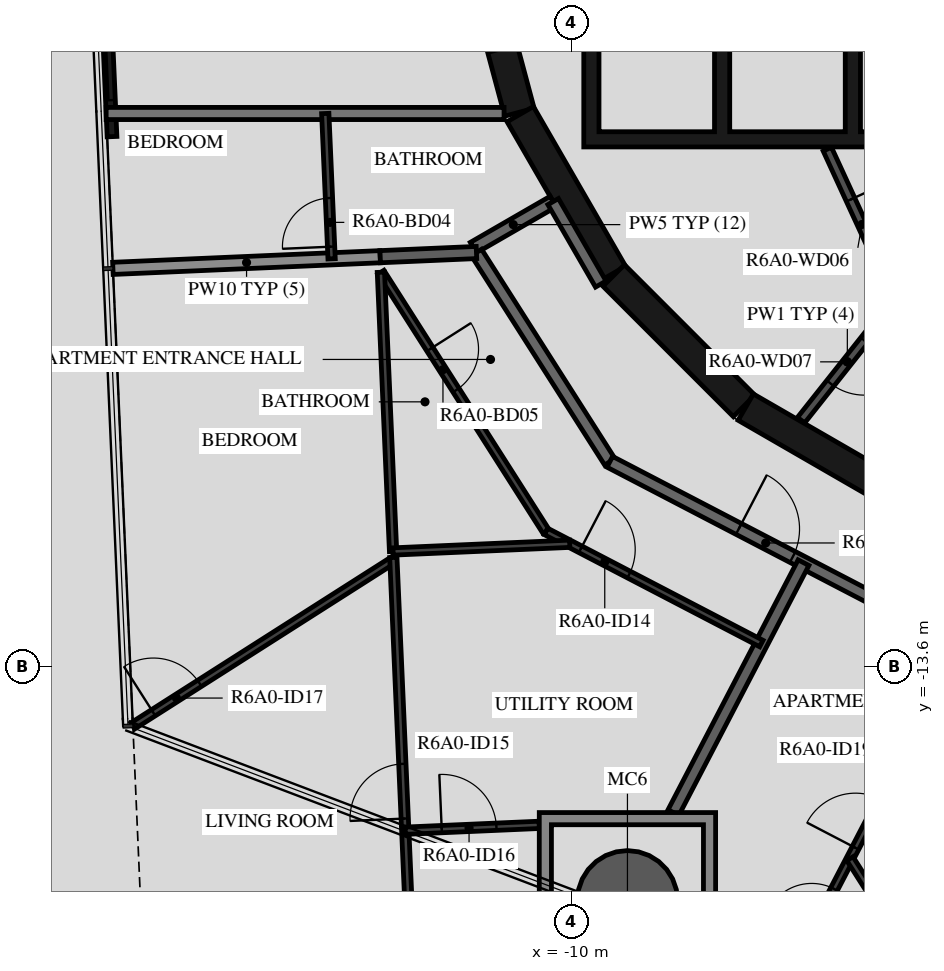
"""IFC4 building model, lengths in metres.
Left out: names, types, materials, properties, quantities, classifications, styles, units other than length and angle.
Written with IfcOpenShell. Run it as: python <this file> out.ifc"""

import sys

from ifc_helpers import new_model, si_unit, direction, frame, frame_2d, origin, origin_2d, place, context, subcontext, project, spatial, polyline, rectangle, hollow_circle, outline, extrude, element, fill, save


model = new_model("IFC4")
c1 = context("Model", 3, precision=1e-05, world=origin(), true_north=direction((0.0, 1.0)))
c2 = subcontext(c1, "Body", "Model", "MODEL_VIEW")
j1 = project(units=[si_unit("LENGTHUNIT", "METRE"), si_unit("PLANEANGLEUNIT", "RADIAN")], contexts=[c1])
p1 = place(None, origin())
s1 = spatial("IfcSite", under=j1, at=p1, CompositionType="ELEMENT")
p2 = place(p1, origin())
s2 = spatial("IfcBuilding", under=s1, at=p2, CompositionType="ELEMENT")
p3 = place(p2, frame((0.0, 0.0, 226.7)))
s3 = spatial("IfcBuildingStorey", under=s2, at=p3, CompositionType="ELEMENT", Elevation=226.7)
p4 = place(p3, frame((-9.082, -17.446, -0.45), z_axis=(0.0, 0.0, 1.0), x_axis=(1.0, 0.0, 0.0)))
e1 = element("IfcColumn", 1, at=p4, inside=s3, PredefinedType="COLUMN", context=c2, shape_type="SweptSolid", body=[
    extrude(hollow_circle(Radius=0.825, WallThickness=0.04, at=origin_2d()), origin(), (0.0, 0.0, 1.0), 3.57),
])
p5 = place(p3, frame((-17.698, -1.684, 0.0), z_axis=(0.0, 0.0, 1.0), x_axis=(0.043639181999, -0.999047357133, 0.0)))
e2 = element("IfcWall", 2, at=p5, inside=s3, PredefinedType="STANDARD", context=c2, shape_type="SweptSolid", body=[
    extrude(rectangle(XDim=3.2, YDim=0.16, at=frame_2d((1.6, 0.0))), origin(), (0.0, 0.0, 1.0), 3.12),
])
p6 = place(p5, frame((0.2, 0.0, 0.0)))
e3 = element("IfcOpeningElement", 3, at=p6, cuts=e2, PredefinedType="OPENING", context=c2, shape_type="SweptSolid", body=[
    extrude(rectangle(XDim=2.4, YDim=2.4, at=frame_2d((1.2, 1.2))), frame((0.0, 0.09, 0.0), z_axis=(0.0, -1.0, 0.0), x_axis=(1.0, 0.0, 0.0)), (0.0, 0.0, 1.0), 0.18),
])
p7 = place(p3, frame((-11.643, -1.55, 0.0), z_axis=(0.0, 0.0, 1.0), x_axis=(0.258734743916, -0.965948410781, 0.0)))
e4 = element("IfcWall", 4, at=p7, inside=s3, PredefinedType="SHEAR", context=c2, shape_type="SweptSolid", body=[
    extrude(rectangle(XDim=3.033, YDim=0.5, at=frame_2d((1.516, 0.0))), origin(), (0.0, 0.0, 1.0), 3.12),
])
p8 = place(p7, frame((1.066, 0.0, 0.0)))
e5 = element("IfcOpeningElement", 5, at=p8, cuts=e4, PredefinedType="OPENING", context=c2, shape_type="SweptSolid", body=[
    extrude(rectangle(XDim=0.9, YDim=2.1, at=frame_2d((0.45, 1.05))), frame((0.0, 0.26, 0.0), z_axis=(0.0, -1.0, 0.0), x_axis=(1.0, 0.0, 0.0)), (0.0, 0.0, 1.0), 0.52),
])
p9 = place(p3, frame((-10.845, -4.51, 0.0), z_axis=(0.0, 0.0, 1.0), x_axis=(0.500087131594, -0.865975092491, 0.0)))
e6 = element("IfcWall", 6, at=p9, inside=s3, PredefinedType="SHEAR", context=c2, shape_type="SweptSolid", body=[
    extrude(rectangle(XDim=3.033, YDim=0.5, at=frame_2d((1.516, 0.0))), origin(), (0.0, 0.0, 1.0), 3.12),
])
p10 = place(p3, frame((-9.308, -7.164, 0.0), z_axis=(0.0, 0.0, 1.0), x_axis=(0.707106781187, -0.707106781187, 0.0)))
e7 = element("IfcWall", 7, at=p10, inside=s3, PredefinedType="SHEAR", context=c2, shape_type="SweptSolid", body=[
    extrude(rectangle(XDim=3.032, YDim=0.5, at=frame_2d((1.516, 0.0))), origin(), (0.0, 0.0, 1.0), 3.12),
])
p11 = place(p3, frame((-7.137, -9.329, 0.0), z_axis=(0.0, 0.0, 1.0), x_axis=(0.865975092491, -0.500087131594, 0.0)))
e8 = element("IfcWall", 8, at=p11, inside=s3, PredefinedType="SHEAR", context=c2, shape_type="SweptSolid", body=[
    extrude(rectangle(XDim=3.033, YDim=0.5, at=frame_2d((1.516, 0.0))), origin(), (0.0, 0.0, 1.0), 3.12),
])
p12 = place(p3, origin())
e9 = element("IfcWall", 9, at=p12, inside=s3, PredefinedType="SHEAR", context=c2, shape_type="SweptSolid", body=[
    extrude(outline(polyline([(9.8, -5.05), (9.8, -4.8), (9.8, -1.9), (9.55, -1.9), (9.55, -4.8), (7.65, -4.8), (7.65, -1.9), (7.4, -1.9), (7.4, -4.8), (5.5, -4.8), (5.5, -1.9), (5.25, -1.9), (5.25, -4.8), (3.35, -4.8), (3.35, -1.9), (3.1, -1.9), (3.1, -4.8), (1.2, -4.8), (1.2, -1.9), (0.95, -1.9), (0.95, -4.8), (-0.95, -4.8), (-0.95, -1.9), (-1.2, -1.9), (-1.2, -4.8), (-5.25, -4.8), (-5.25, -1.9), (-5.5, -1.9), (-5.5, -4.8), (-7.4, -4.8), (-7.4, -1.9), (-7.65, -1.9), (-7.65, -4.8), (-9.55, -4.8), (-9.55, -1.9), (-9.8, -1.9), (-9.8, -4.8), (-9.8, -5.05), (9.8, -5.05)])), origin(), (0.0, 0.0, 1.0), 3.12),
])
p13 = place(p3, frame((-5.795, -5.086, 0.0), z_axis=(0.0, 0.0, 1.0), x_axis=(0.417887867606, -0.908498613157, 0.0)))
e10 = element("IfcWall", 10, at=p13, inside=s3, PredefinedType="PARTITIONING", context=c2, shape_type="SweptSolid", body=[
    extrude(rectangle(XDim=2.726, YDim=0.15, at=frame_2d((1.363, 0.0))), origin(), (0.0, 0.0, 1.0), 3.12),
])
p14 = place(p13, frame((0.913, 0.0, 0.0)))
e11 = element("IfcOpeningElement", 11, at=p14, cuts=e10, PredefinedType="OPENING", context=c2, shape_type="SweptSolid", body=[
    extrude(rectangle(XDim=0.9, YDim=2.1, at=frame_2d((0.45, 1.05))), frame((0.0, 0.085, 0.0), z_axis=(0.0, -1.0, 0.0), x_axis=(1.0, 0.0, 0.0)), (0.0, 0.0, 1.0), 0.17),
])
p15 = place(p3, frame((-4.706, -7.625, 0.0), z_axis=(0.0, 0.0, 1.0), x_axis=(-0.621392599334, -0.783499353856, 0.0)))
e12 = element("IfcWall", 12, at=p15, inside=s3, PredefinedType="PARTITIONING", context=c2, shape_type="SweptSolid", body=[
    extrude(rectangle(XDim=2.447, YDim=0.15, at=frame_2d((1.224, 0.0))), origin(), (0.0, 0.0, 1.0), 3.12),
])
p16 = place(p15, frame((0.774, 0.0, 0.0)))
e13 = element("IfcOpeningElement", 13, at=p16, cuts=e12, PredefinedType="OPENING", context=c2, shape_type="SweptSolid", body=[
    extrude(rectangle(XDim=0.9, YDim=2.1, at=frame_2d((0.45, 1.05))), frame((0.0, 0.085, 0.0), z_axis=(0.0, -1.0, 0.0), x_axis=(1.0, 0.0, 0.0)), (0.0, 0.0, 1.0), 0.17),
])
p17 = place(p3, frame((-10.303, -5.949, 0.0), z_axis=(0.0, 0.0, 1.0), x_axis=(-0.866043382451, -0.499968858743, 0.0)))
e14 = element("IfcWall", 14, at=p17, inside=s3, PredefinedType="STANDARD", context=c2, shape_type="SweptSolid", body=[
    extrude(rectangle(XDim=1.515, YDim=0.2, at=frame_2d((0.758, 0.0))), origin(), (0.0, 0.0, 1.0), 3.12),
])
p18 = place(p3, frame((-9.52, -7.305, 0.0), z_axis=(0.0, 0.0, 1.0), x_axis=(-0.500028278809, 0.866009076391, 0.0)))
e15 = element("IfcWall", 15, at=p18, inside=s3, PredefinedType="STANDARD", context=c2, shape_type="SweptSolid", body=[
    extrude(rectangle(XDim=1.566, YDim=0.2, at=frame_2d((0.783, 0.0))), origin(), (0.0, 0.0, 1.0), 3.12),
])
p19 = place(p3, frame((-11.565, -6.786, 0.0), z_axis=(0.0, 0.0, 1.0), x_axis=(0.537297327359, -0.843392898958, 0.0)))
e16 = element("IfcWall", 16, at=p19, inside=s3, PredefinedType="STANDARD", context=c2, shape_type="SweptSolid", body=[
    extrude(rectangle(XDim=4.081, YDim=0.2, at=frame_2d((2.041, 0.0))), origin(), (0.0, 0.0, 1.0), 3.12),
])
p20 = place(p3, frame((-9.372, -10.228, 0.0), z_axis=(0.0, 0.0, 1.0), x_axis=(0.887005184532, -0.461759464021, 0.0)))
e17 = element("IfcWall", 17, at=p20, inside=s3, PredefinedType="STANDARD", context=c2, shape_type="SweptSolid", body=[
    extrude(rectangle(XDim=7.181, YDim=0.2, at=frame_2d((3.591, 0.0))), origin(), (0.0, 0.0, 1.0), 3.12),
])
p21 = place(p20, frame((2.391, 0.0, 0.0)))
e18 = element("IfcOpeningElement", 18, at=p21, cuts=e17, PredefinedType="OPENING", context=c2, shape_type="SweptSolid", body=[
    extrude(rectangle(XDim=1.0, YDim=2.1, at=frame_2d((0.5, 1.05))), frame((0.0, 0.11, 0.0), z_axis=(0.0, -1.0, 0.0), x_axis=(1.0, 0.0, 0.0)), (0.0, 0.0, 1.0), 0.22),
])
p22 = place(p3, frame((-17.655, -4.5, 0.0), z_axis=(0.0, 0.0, 1.0), x_axis=(1.0, 0.0, 0.0)))
e19 = element("IfcWall", 19, at=p22, inside=s3, PredefinedType="STANDARD", context=c2, shape_type="SweptSolid", body=[
    extrude(rectangle(XDim=6.543, YDim=0.2, at=frame_2d((3.272, 0.0))), origin(), (0.0, 0.0, 1.0), 3.12),
])
p23 = place(p3, frame((-17.544, -7.047, 0.0), z_axis=(0.0, 0.0, 1.0), x_axis=(0.99904608111, 0.043668384662, 0.0)))
e20 = element("IfcWall", 20, at=p23, inside=s3, PredefinedType="STANDARD", context=c2, shape_type="SweptSolid", body=[
    extrude(rectangle(XDim=4.4, YDim=0.2, at=frame_2d((2.2, 0.0))), origin(), (0.0, 0.0, 1.0), 2.73),
])
p24 = place(p3, frame((-13.148, -6.855, 0.0), z_axis=(0.0, 0.0, 1.0), x_axis=(0.999048583464, 0.043611098121, 0.0)))
e21 = element("IfcWall", 21, at=p24, inside=s3, PredefinedType="STANDARD", context=c2, shape_type="SweptSolid", body=[
    extrude(rectangle(XDim=1.584, YDim=0.2, at=frame_2d((0.792, 0.0))), origin(), (0.0, 0.0, 1.0), 3.12),
])
p25 = place(p3, frame((-8.326, -15.996, 0.0), z_axis=(0.0, 0.0, 1.0), x_axis=(0.461739255077, 0.887015704664, 0.0)))
e22 = element("IfcWall", 22, at=p25, inside=s3, PredefinedType="STANDARD", context=c2, shape_type="SweptSolid", body=[
    extrude(rectangle(XDim=4.633, YDim=0.2, at=frame_2d((2.317, 0.0))), origin(), (0.0, 0.0, 1.0), 3.12),
])
p26 = place(p3, frame((-13.947, -6.89, 0.0), z_axis=(0.0, 0.0, 1.0), x_axis=(-0.043680814195, 0.999045537737, 0.0)))
e23 = element("IfcWall", 23, at=p26, inside=s3, PredefinedType="PARTITIONING", context=c2, shape_type="SweptSolid", body=[
    extrude(rectangle(XDim=2.392, YDim=0.12, at=frame_2d((1.196, 0.0))), origin(), (0.0, 0.0, 1.0), 3.12),
])
p27 = place(p26, frame((0.2, 0.0, 0.0)))
e24 = element("IfcOpeningElement", 24, at=p27, cuts=e23, PredefinedType="OPENING", context=c2, shape_type="SweptSolid", body=[
    extrude(rectangle(XDim=0.8, YDim=2.1, at=frame_2d((0.4, 1.05))), frame((0.0, 0.07, 0.0), z_axis=(0.0, -1.0, 0.0), x_axis=(1.0, 0.0, 0.0)), (0.0, 0.0, 1.0), 0.14),
])
p28 = place(p3, frame((-13.137, -7.111, 0.0), z_axis=(0.0, 0.0, 1.0), x_axis=(0.537300549444, -0.843390846267, 0.0)))
e25 = element("IfcWall", 25, at=p28, inside=s3, PredefinedType="PARTITIONING", context=c2, shape_type="SweptSolid", body=[
    extrude(rectangle(XDim=5.054, YDim=0.12, at=frame_2d((2.527, 0.0))), origin(), (0.0, 0.0, 1.0), 3.12),
])
p29 = place(p28, frame((1.5, 0.0, 0.0)))
e26 = element("IfcOpeningElement", 26, at=p29, cuts=e25, PredefinedType="OPENING", context=c2, shape_type="SweptSolid", body=[
    extrude(rectangle(XDim=0.8, YDim=2.1, at=frame_2d((0.4, 1.05))), frame((0.0, 0.07, 0.0), z_axis=(0.0, -1.0, 0.0), x_axis=(1.0, 0.0, 0.0)), (0.0, 0.0, 1.0), 0.14),
])
p30 = place(p3, frame((-10.421, -11.373, 0.0), z_axis=(0.0, 0.0, 1.0), x_axis=(0.887006451745, -0.461757029792, 0.0)))
e27 = element("IfcWall", 27, at=p30, inside=s3, PredefinedType="PARTITIONING", context=c2, shape_type="SweptSolid", body=[
    extrude(rectangle(XDim=3.992, YDim=0.12, at=frame_2d((1.996, 0.0))), origin(), (0.0, 0.0, 1.0), 3.12),
])
p31 = place(p30, frame((0.639, 0.0, 0.0)))
e28 = element("IfcOpeningElement", 28, at=p31, cuts=e27, PredefinedType="OPENING", context=c2, shape_type="SweptSolid", body=[
    extrude(rectangle(XDim=0.9, YDim=2.1, at=frame_2d((0.45, 1.05))), frame((0.0, 0.07, 0.0), z_axis=(0.0, -1.0, 0.0), x_axis=(1.0, 0.0, 0.0)), (0.0, 0.0, 1.0), 0.14),
])
p32 = place(p3, frame((-12.936, -11.703, 0.0), z_axis=(0.0, 0.0, 1.0), x_axis=(-0.043610108597, 0.999048626658, 0.0)))
e29 = element("IfcWall", 29, at=p32, inside=s3, PredefinedType="PARTITIONING", context=c2, shape_type="SweptSolid", body=[
    extrude(rectangle(XDim=4.596, YDim=0.12, at=frame_2d((2.298, 0.0))), origin(), (0.0, 0.0, 1.0), 3.12),
])
p33 = place(p3, frame((-17.215, -14.57, 0.0), z_axis=(0.0, 0.0, 1.0), x_axis=(0.843396239681, 0.537292083407, 0.0)))
e30 = element("IfcWall", 30, at=p33, inside=s3, PredefinedType="PARTITIONING", context=c2, shape_type="SweptSolid", body=[
    extrude(rectangle(XDim=5.081, YDim=0.12, at=frame_2d((2.54, 0.0))), origin(), (0.0, 0.0, 1.0), 3.12),
])
p34 = place(p33, frame((0.4, 0.0, 0.0)))
e31 = element("IfcOpeningElement", 31, at=p34, cuts=e30, PredefinedType="OPENING", context=c2, shape_type="SweptSolid", body=[
    extrude(rectangle(XDim=0.9, YDim=2.1, at=frame_2d((0.45, 1.05))), frame((0.0, 0.07, 0.0), z_axis=(0.0, -1.0, 0.0), x_axis=(1.0, 0.0, 0.0)), (0.0, 0.0, 1.0), 0.14),
])
p35 = place(p3, frame((-12.936, -11.703, 0.0), z_axis=(0.0, 0.0, 1.0), x_axis=(0.999046310188, 0.043663143495, 0.0)))
e32 = element("IfcWall", 32, at=p35, inside=s3, PredefinedType="PARTITIONING", context=c2, shape_type="SweptSolid", body=[
    extrude(rectangle(XDim=2.907, YDim=0.12, at=frame_2d((1.454, 0.0))), origin(), (0.0, 0.0, 1.0), 3.12),
])
p36 = place(p3, frame((-12.69, -17.347, 0.0), z_axis=(0.0, 0.0, 1.0), x_axis=(-0.043618497177, 0.999048260448, 0.0)))
e33 = element("IfcWall", 33, at=p36, inside=s3, PredefinedType="PARTITIONING", context=c2, shape_type="SweptSolid", body=[
    extrude(rectangle(XDim=5.552, YDim=0.12, at=frame_2d((2.776, 0.0))), origin(), (0.0, 0.0, 1.0), 3.12),
])
p37 = place(p36, frame((1.254, 0.0, 0.0)))
e34 = element("IfcOpeningElement", 34, at=p37, cuts=e33, PredefinedType="OPENING", context=c2, shape_type="SweptSolid", body=[
    extrude(rectangle(XDim=0.9, YDim=2.1, at=frame_2d((0.45, 1.05))), frame((0.0, 0.07, 0.0), z_axis=(0.0, -1.0, 0.0), x_axis=(1.0, 0.0, 0.0)), (0.0, 0.0, 1.0), 0.14),
])
p38 = place(p3, frame((-12.736, -16.295, 0.0), z_axis=(0.0, 0.0, 1.0), x_axis=(0.999043796611, 0.043720618177, 0.0)))
e35 = element("IfcWall", 35, at=p38, inside=s3, PredefinedType="PARTITIONING", context=c2, shape_type="SweptSolid", body=[
    extrude(rectangle(XDim=2.206, YDim=0.12, at=frame_2d((1.103, 0.0))), origin(), (0.0, 0.0, 1.0), 3.12),
])
p39 = place(p38, frame((0.6, 0.0, 0.0)))
e36 = element("IfcOpeningElement", 36, at=p39, cuts=e35, PredefinedType="OPENING", context=c2, shape_type="SweptSolid", body=[
    extrude(rectangle(XDim=0.9, YDim=2.1, at=frame_2d((0.45, 1.05))), frame((0.0, 0.07, 0.0), z_axis=(0.0, -1.0, 0.0), x_axis=(1.0, 0.0, 0.0)), (0.0, 0.0, 1.0), 0.14),
])
p40 = place(p3, frame((-6.329, -18.494, 0.0), z_axis=(0.0, 0.0, 1.0), x_axis=(0.461759058182, 0.887005395805, 0.0)))
e37 = element("IfcWall", 37, at=p40, inside=s3, PredefinedType="PARTITIONING", context=c2, shape_type="SweptSolid", body=[
    extrude(rectangle(XDim=4.427, YDim=0.12, at=frame_2d((2.213, 0.0))), origin(), (0.0, 0.0, 1.0), 3.12),
])
p41 = place(p40, frame((0.6, 0.0, 0.0)))
e38 = element("IfcOpeningElement", 38, at=p41, cuts=e37, PredefinedType="OPENING", context=c2, shape_type="SweptSolid", body=[
    extrude(rectangle(XDim=0.8, YDim=2.1, at=frame_2d((0.4, 1.05))), frame((0.0, 0.07, 0.0), z_axis=(0.0, -1.0, 0.0), x_axis=(1.0, 0.0, 0.0)), (0.0, 0.0, 1.0), 0.14),
])
p42 = place(p40, frame((2.161, 0.0, 0.0)))
e39 = element("IfcOpeningElement", 39, at=p42, cuts=e37, PredefinedType="OPENING", context=c2, shape_type="SweptSolid", body=[
    extrude(rectangle(XDim=0.9, YDim=2.1, at=frame_2d((0.45, 1.05))), frame((0.0, 0.07, 0.0), z_axis=(0.0, -1.0, 0.0), x_axis=(1.0, 0.0, 0.0)), (0.0, 0.0, 1.0), 0.14),
])
p43 = place(p3, frame((-4.662, -17.95, 0.0), z_axis=(0.0, 0.0, 1.0), x_axis=(-0.537254271207, 0.843420327043, 0.0)))
e40 = element("IfcWall", 40, at=p43, inside=s3, PredefinedType="PARTITIONING", context=c2, shape_type="SweptSolid", body=[
    extrude(rectangle(XDim=1.418, YDim=0.12, at=frame_2d((0.709, 0.0))), origin(), (0.0, 0.0, 1.0), 3.12),
])
p44 = place(p3, frame((-7.322, -19.645, 0.0), z_axis=(0.0, 0.0, 1.0), x_axis=(0.843385361817, 0.537309158188, 0.0)))
e41 = element("IfcWall", 41, at=p44, inside=s3, PredefinedType="PARTITIONING", context=c2, shape_type="SweptSolid", body=[
    extrude(rectangle(XDim=8.814, YDim=0.12, at=frame_2d((4.407, 0.0))), origin(), (0.0, 0.0, 1.0), 3.12),
])
p45 = place(p44, frame((3.314, 0.0, 0.0)))
e42 = element("IfcOpeningElement", 42, at=p45, cuts=e41, PredefinedType="OPENING", context=c2, shape_type="SweptSolid", body=[
    extrude(rectangle(XDim=0.9, YDim=2.1, at=frame_2d((0.45, 1.05))), frame((0.0, 0.07, 0.0), z_axis=(0.0, -1.0, 0.0), x_axis=(1.0, 0.0, 0.0)), (0.0, 0.0, 1.0), 0.14),
])
p46 = place(p3, origin())
e43 = element("IfcWall", 43, at=p46, inside=s3, PredefinedType="STANDARD", context=c2, shape_type="SweptSolid", body=[
    extrude(outline(polyline([(-7.632, -15.996), (-7.632, -18.896), (-10.532, -18.896), (-10.532, -15.996), (-7.632, -15.996)]), holes=[polyline([(-10.332, -18.696), (-7.832, -18.696), (-7.832, -16.196), (-10.332, -16.196), (-10.332, -18.696)])]), origin(), (0.0, 0.0, 1.0), 3.12),
])
p47 = place(p6, origin())
e44 = element("IfcDoor", 44, at=p47, inside=s3, OperationType="DOUBLE_DOOR_SLIDING", PredefinedType="DOOR", context=c2, shape_type="SweptSolid", body=[
    extrude(rectangle(XDim=2.4, YDim=2.4, at=frame_2d((1.2, 1.2))), frame((0.0, 0.025, 0.0), z_axis=(0.0, -1.0, 0.0), x_axis=(1.0, 0.0, 0.0)), (0.0, 0.0, 1.0), 0.05),
])
fill(e3, e44)
p48 = place(p14, origin())
e45 = element("IfcDoor", 45, at=p48, inside=s3, OperationType="SINGLE_SWING_RIGHT", PredefinedType="DOOR", context=c2, shape_type="SweptSolid", body=[
    extrude(rectangle(XDim=0.9, YDim=2.1, at=frame_2d((0.45, 1.05))), frame((0.0, 0.025, 0.0), z_axis=(0.0, -1.0, 0.0), x_axis=(1.0, 0.0, 0.0)), (0.0, 0.0, 1.0), 0.05),
])
fill(e11, e45)
p49 = place(p16, origin())
e46 = element("IfcDoor", 46, at=p49, inside=s3, OperationType="SINGLE_SWING_LEFT", PredefinedType="DOOR", context=c2, shape_type="SweptSolid", body=[
    extrude(rectangle(XDim=0.9, YDim=2.1, at=frame_2d((0.45, 1.05))), frame((0.0, 0.025, 0.0), z_axis=(0.0, -1.0, 0.0), x_axis=(1.0, 0.0, 0.0)), (0.0, 0.0, 1.0), 0.05),
])
fill(e13, e46)
p50 = place(p27, origin())
e47 = element("IfcDoor", 47, at=p50, inside=s3, OperationType="SINGLE_SWING_LEFT", PredefinedType="DOOR", context=c2, shape_type="SweptSolid", body=[
    extrude(rectangle(XDim=0.8, YDim=2.1, at=frame_2d((0.4, 1.05))), frame((0.0, 0.025, 0.0), z_axis=(0.0, -1.0, 0.0), x_axis=(1.0, 0.0, 0.0)), (0.0, 0.0, 1.0), 0.05),
])
fill(e24, e47)
p51 = place(p21, origin())
e48 = element("IfcDoor", 48, at=p51, inside=s3, OperationType="SINGLE_SWING_RIGHT", PredefinedType="DOOR", context=c2, shape_type="SweptSolid", body=[
    extrude(rectangle(XDim=1.0, YDim=2.1, at=frame_2d((0.5, 1.05))), frame((0.0, 0.025, 0.0), z_axis=(0.0, -1.0, 0.0), x_axis=(1.0, 0.0, 0.0)), (0.0, 0.0, 1.0), 0.05),
])
fill(e18, e48)
p52 = place(p29, origin())
e49 = element("IfcDoor", 49, at=p52, inside=s3, OperationType="SINGLE_SWING_RIGHT", PredefinedType="DOOR", context=c2, shape_type="SweptSolid", body=[
    extrude(rectangle(XDim=0.8, YDim=2.1, at=frame_2d((0.4, 1.05))), frame((0.0, 0.025, 0.0), z_axis=(0.0, -1.0, 0.0), x_axis=(1.0, 0.0, 0.0)), (0.0, 0.0, 1.0), 0.05),
])
fill(e26, e49)
p53 = place(p31, origin())
e50 = element("IfcDoor", 50, at=p53, inside=s3, OperationType="SINGLE_SWING_RIGHT", PredefinedType="DOOR", context=c2, shape_type="SweptSolid", body=[
    extrude(rectangle(XDim=0.9, YDim=2.1, at=frame_2d((0.45, 1.05))), frame((0.0, 0.025, 0.0), z_axis=(0.0, -1.0, 0.0), x_axis=(1.0, 0.0, 0.0)), (0.0, 0.0, 1.0), 0.05),
])
fill(e28, e50)
p54 = place(p37, origin())
e51 = element("IfcDoor", 51, at=p54, inside=s3, OperationType="SINGLE_SWING_RIGHT", PredefinedType="DOOR", context=c2, shape_type="SweptSolid", body=[
    extrude(rectangle(XDim=0.9, YDim=2.1, at=frame_2d((0.45, 1.05))), frame((0.0, 0.025, 0.0), z_axis=(0.0, -1.0, 0.0), x_axis=(1.0, 0.0, 0.0)), (0.0, 0.0, 1.0), 0.05),
])
fill(e34, e51)
p55 = place(p39, origin())
e52 = element("IfcDoor", 52, at=p55, inside=s3, OperationType="SINGLE_SWING_RIGHT", PredefinedType="DOOR", context=c2, shape_type="SweptSolid", body=[
    extrude(rectangle(XDim=0.9, YDim=2.1, at=frame_2d((0.45, 1.05))), frame((0.0, 0.025, 0.0), z_axis=(0.0, -1.0, 0.0), x_axis=(1.0, 0.0, 0.0)), (0.0, 0.0, 1.0), 0.05),
])
fill(e36, e52)
p56 = place(p34, origin())
e53 = element("IfcDoor", 53, at=p56, inside=s3, OperationType="SINGLE_SWING_LEFT", PredefinedType="DOOR", context=c2, shape_type="SweptSolid", body=[
    extrude(rectangle(XDim=0.9, YDim=2.1, at=frame_2d((0.45, 1.05))), frame((0.0, 0.025, 0.0), z_axis=(0.0, -1.0, 0.0), x_axis=(1.0, 0.0, 0.0)), (0.0, 0.0, 1.0), 0.05),
])
fill(e31, e53)
p57 = place(p41, origin())
e54 = element("IfcDoor", 54, at=p57, inside=s3, OperationType="SINGLE_SWING_LEFT", PredefinedType="DOOR", context=c2, shape_type="SweptSolid", body=[
    extrude(rectangle(XDim=0.8, YDim=2.1, at=frame_2d((0.4, 1.05))), frame((0.0, 0.025, 0.0), z_axis=(0.0, -1.0, 0.0), x_axis=(1.0, 0.0, 0.0)), (0.0, 0.0, 1.0), 0.05),
])
fill(e38, e54)
p58 = place(p42, origin())
e55 = element("IfcDoor", 55, at=p58, inside=s3, OperationType="SINGLE_SWING_LEFT", PredefinedType="DOOR", context=c2, shape_type="SweptSolid", body=[
    extrude(rectangle(XDim=0.9, YDim=2.1, at=frame_2d((0.45, 1.05))), frame((0.0, 0.025, 0.0), z_axis=(0.0, -1.0, 0.0), x_axis=(1.0, 0.0, 0.0)), (0.0, 0.0, 1.0), 0.05),
])
fill(e39, e55)
save(model, sys.argv[1])
